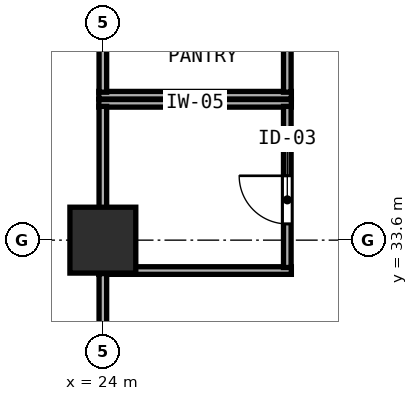
"""IFC4 building model, lengths in metres.
Left out: names, types, materials, properties, quantities, classifications, styles, units other than length and angle.
Written with IfcOpenShell. Run it as: python <this file> out.ifc"""

import sys

from ifc_helpers import new_model, si_unit, direction, frame, frame_2d, origin, origin_2d, place, context, subcontext, project, spatial, rectangle, hollow_rectangle, extrude, element, fill, save


model = new_model("IFC4")
c1 = context("Model", 3, precision=1e-05, world=origin(), true_north=direction((0.0, 1.0)))
c2 = subcontext(c1, "Body", "Model", "MODEL_VIEW")
j1 = project(units=[si_unit("LENGTHUNIT", "METRE"), si_unit("PLANEANGLEUNIT", "RADIAN")], contexts=[c1])
p1 = place(None, origin())
s1 = spatial("IfcSite", under=j1, at=p1, CompositionType="ELEMENT")
p2 = place(p1, origin())
s2 = spatial("IfcBuilding", under=s1, at=p2, CompositionType="ELEMENT")
p3 = place(p2, frame((0.0, 0.0, 31.6)))
s3 = spatial("IfcBuildingStorey", under=s2, at=p3, CompositionType="ELEMENT", Elevation=31.6)
p4 = place(p3, frame((24.0, 33.6, 0.0), z_axis=(0.0, 0.0, 1.0), x_axis=(1.0, 0.0, 0.0)))
e1 = element("IfcColumn", 1, at=p4, inside=s3, PredefinedType="COLUMN", context=c2, shape_type="SweptSolid", body=[
    extrude(hollow_rectangle(XDim=1.3, YDim=1.3, WallThickness=0.048, at=origin_2d()), origin(), (0.0, 0.0, 1.0), 3.8),
])
for number, where, z_axis, x_axis in (
    (2, (23.92, 36.3, 0.0), (0.0, 0.0, 1.0), (1.0, 0.0, 0.0)),
    (3, (23.92, 33.0, 0.0), (0.0, 0.0, 1.0), (1.0, 0.0, 0.0)),
):
    element("IfcWall", number, at=place(p3, frame(where, z_axis=z_axis, x_axis=x_axis)), inside=s3, PredefinedType="PARTITIONING", context=c2, shape_type="SweptSolid", body=[
        extrude(rectangle(XDim=3.8, YDim=0.15, at=frame_2d((1.9, 0.0))), origin(), (0.0, 0.0, 1.0), 3.6),
    ])
p5 = place(p3, frame((24.0, 33.06, 0.0), z_axis=(0.0, 0.0, 1.0), x_axis=(0.0, 1.0, 0.0)))
e4 = element("IfcWall", 4, at=p5, inside=s3, PredefinedType="PARTITIONING", context=c2, shape_type="SweptSolid", body=[
    extrude(rectangle(XDim=3.18, YDim=0.15, at=frame_2d((1.59, 0.0))), origin(), (0.0, 0.0, 1.0), 3.097),
])
p6 = place(p3, frame((27.64, 33.06, 0.0), z_axis=(0.0, 0.0, 1.0), x_axis=(0.0, 1.0, 0.0)))
e5 = element("IfcWall", 5, at=p6, inside=s3, PredefinedType="PARTITIONING", context=c2, shape_type="SweptSolid", body=[
    extrude(rectangle(XDim=3.18, YDim=0.15, at=frame_2d((1.59, 0.0))), origin(), (0.0, 0.0, 1.0), 3.6),
])
p7 = place(p6, frame((1.81, 0.0, 0.0), z_axis=(0.0, 0.0, 1.0), x_axis=(-1.0, 0.0, 0.0)))
e6 = element("IfcOpeningElement", 6, at=p7, cuts=e5, PredefinedType="OPENING", context=c2, shape_type="SweptSolid", body=[
    extrude(rectangle(XDim=0.95, YDim=2.12, at=frame_2d((0.475, 1.06))), frame((0.0, 0.085, 0.0), z_axis=(0.0, -1.0, 0.0), x_axis=(1.0, 0.0, 0.0)), (0.0, 0.0, 1.0), 0.17),
])
p8 = place(p3, frame((23.92, 36.46, 0.0), z_axis=(0.0, 0.0, 1.0), x_axis=(1.0, 0.0, 0.0)))
e7 = element("IfcWall", 7, at=p8, inside=s3, PredefinedType="PARTITIONING", context=c2, shape_type="SweptSolid", body=[
    extrude(rectangle(XDim=3.8, YDim=0.15, at=frame_2d((1.9, 0.0))), origin(), (0.0, 0.0, 1.0), 3.6),
])
p9 = place(p3, frame((24.0, 36.52, 0.0), z_axis=(0.0, 0.0, 1.0), x_axis=(0.0, 1.0, 0.0)))
e8 = element("IfcWall", 8, at=p9, inside=s3, PredefinedType="PARTITIONING", context=c2, shape_type="SweptSolid", body=[
    extrude(rectangle(XDim=4.02, YDim=0.15, at=frame_2d((2.01, 0.0))), origin(), (0.0, 0.0, 1.0), 3.097),
])
p10 = place(p3, frame((27.64, 36.52, 0.0), z_axis=(0.0, 0.0, 1.0), x_axis=(0.0, 1.0, 0.0)))
e9 = element("IfcWall", 9, at=p10, inside=s3, PredefinedType="PARTITIONING", context=c2, shape_type="SweptSolid", body=[
    extrude(rectangle(XDim=4.02, YDim=0.15, at=frame_2d((2.01, 0.0))), origin(), (0.0, 0.0, 1.0), 3.6),
])
p11 = place(p10, frame((2.01, 0.0, 0.0), z_axis=(0.0, 0.0, 1.0), x_axis=(-1.0, 0.0, 0.0)))
e10 = element("IfcOpeningElement", 10, at=p11, cuts=e9, PredefinedType="OPENING", context=c2, shape_type="SweptSolid", body=[
    extrude(rectangle(XDim=0.95, YDim=2.12, at=frame_2d((0.475, 1.06))), frame((0.0, 0.085, 0.0), z_axis=(0.0, -1.0, 0.0), x_axis=(1.0, 0.0, 0.0)), (0.0, 0.0, 1.0), 0.17),
])
p12 = place(p3, frame((24.0, 30.44, 0.0), z_axis=(0.0, 0.0, 1.0), x_axis=(0.0, 1.0, 0.0)))
e11 = element("IfcWall", 11, at=p12, inside=s3, PredefinedType="PARTITIONING", context=c2, shape_type="SweptSolid", body=[
    extrude(rectangle(XDim=2.5, YDim=0.15, at=frame_2d((1.25, 0.0))), origin(), (0.0, 0.0, 1.0), 3.097),
])
p13 = place(p7, origin())
e12 = element("IfcDoor", 12, at=p13, inside=s3, OperationType="SINGLE_SWING_LEFT", PredefinedType="DOOR", context=c2, shape_type="SweptSolid", body=[
    extrude(rectangle(XDim=0.95, YDim=2.12, at=frame_2d((0.475, 1.06))), frame((0.0, 0.025, 0.0), z_axis=(0.0, -1.0, 0.0), x_axis=(1.0, 0.0, 0.0)), (0.0, 0.0, 1.0), 0.05),
])
fill(e6, e12)
save(model, sys.argv[1])
